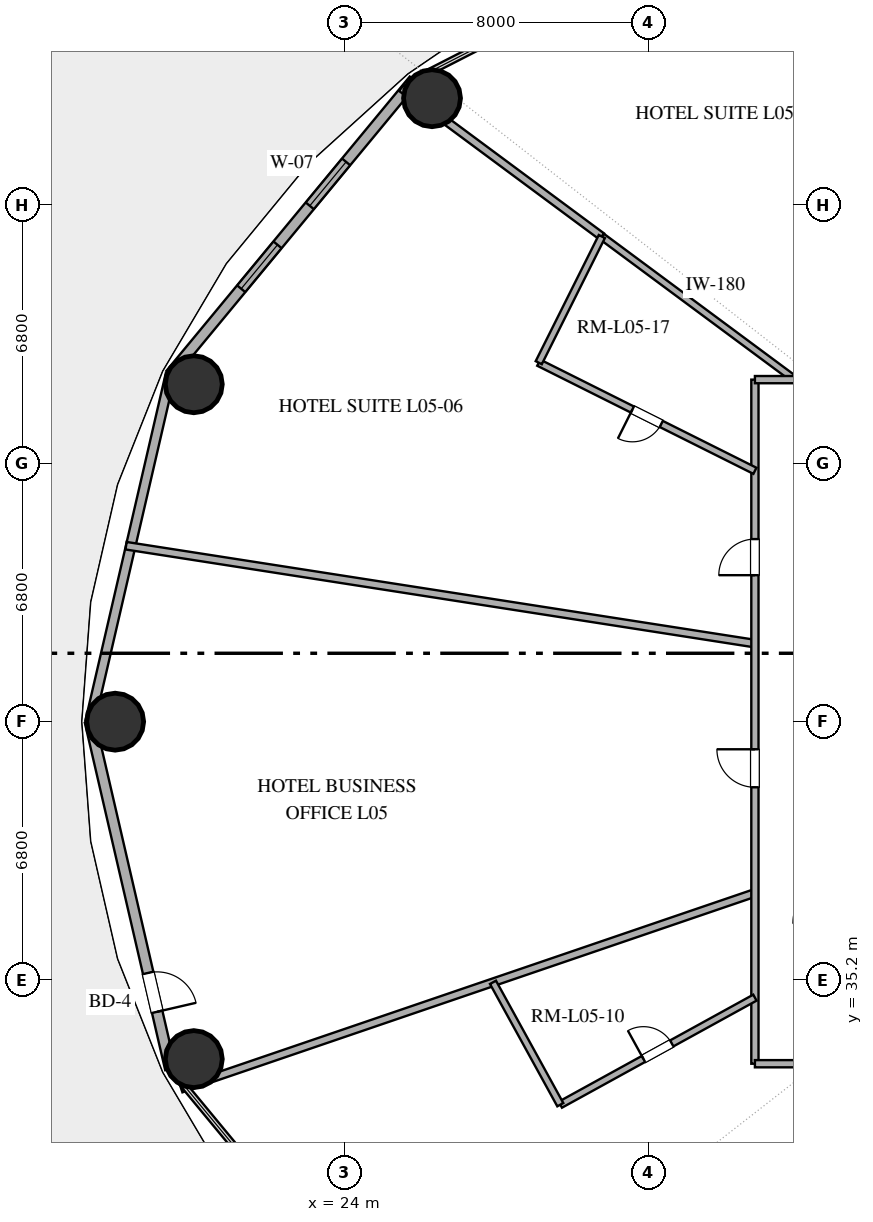
"""IFC4 building model, lengths in metres.
Left out: names, types, materials, properties, quantities, classifications, styles, units other than length and angle.
Written with IfcOpenShell. Run it as: python <this file> out.ifc"""

import sys

from ifc_helpers import new_model, si_unit, direction, frame, frame_2d, origin, origin_2d, place, context, subcontext, project, spatial, rectangle, hollow_circle, extrude, element, fill, save


model = new_model("IFC4")
c1 = context("Model", 3, precision=1e-05, world=origin(), true_north=direction((0.0, 1.0)))
c2 = subcontext(c1, "Body", "Model", "MODEL_VIEW")
j1 = project(units=[si_unit("LENGTHUNIT", "METRE"), si_unit("PLANEANGLEUNIT", "RADIAN")], contexts=[c1])
p1 = place(None, origin())
s1 = spatial("IfcSite", under=j1, at=p1, CompositionType="ELEMENT")
p2 = place(p1, origin())
s2 = spatial("IfcBuilding", under=s1, at=p2, CompositionType="ELEMENT")
p3 = place(p2, frame((0.0, 0.0, 28.2)))
s3 = spatial("IfcBuildingStorey", under=s2, at=p3, CompositionType="ELEMENT", Elevation=28.2)
for number, where, z_axis, x_axis in (
    (1, (26.303, 58.405, 0.0), (0.0, 0.0, 1.0), (1.0, 0.0, 0.0)),
    (2, (20.034, 50.878, 0.0), (0.0, 0.0, 1.0), (1.0, 0.0, 0.0)),
    (3, (17.965, 42.0, 0.0), (0.0, 0.0, 1.0), (1.0, 0.0, 0.0)),
    (4, (20.034, 33.122, 0.0), (0.0, 0.0, 1.0), (1.0, 0.0, 0.0)),
):
    element("IfcColumn", number, at=place(p3, frame(where, z_axis=z_axis, x_axis=x_axis)), inside=s3, PredefinedType="COLUMN", context=c2, shape_type="SweptSolid", body=[
        extrude(hollow_circle(Radius=0.75, WallThickness=0.04, at=origin_2d()), origin(), (0.0, 0.0, 1.0), 3.38),
    ])
p4 = place(p3, frame((25.826, 58.886, 0.0), z_axis=(0.0, 0.0, 1.0), x_axis=(-0.637296809613, -0.770618437657, 0.0)))
e5 = element("IfcWall", 5, at=p4, inside=s3, PredefinedType="SOLIDWALL", context=c2, shape_type="SweptSolid", body=[
    extrude(rectangle(XDim=10.053, YDim=0.28, at=frame_2d((5.027, 0.0))), origin(), (0.0, 0.0, 1.0), 3.38),
])
p5 = place(p4, frame((2.798, 0.0, 0.85)))
e6 = element("IfcOpeningElement", 6, at=p5, cuts=e5, PredefinedType="OPENING", context=c2, shape_type="SweptSolid", body=[
    extrude(rectangle(XDim=1.5, YDim=1.8, at=frame_2d((0.75, 0.9))), frame((0.0, 0.15, 0.0), z_axis=(0.0, -1.0, 0.0), x_axis=(1.0, 0.0, 0.0)), (0.0, 0.0, 1.0), 0.3),
])
p6 = place(p4, frame((5.63, 0.0, 0.85)))
e7 = element("IfcOpeningElement", 7, at=p6, cuts=e5, PredefinedType="OPENING", context=c2, shape_type="SweptSolid", body=[
    extrude(rectangle(XDim=1.5, YDim=1.8, at=frame_2d((0.75, 0.9))), frame((0.0, 0.15, 0.0), z_axis=(0.0, -1.0, 0.0), x_axis=(1.0, 0.0, 0.0)), (0.0, 0.0, 1.0), 0.3),
])
p7 = place(p3, frame((19.419, 51.138, 0.0), z_axis=(0.0, 0.0, 1.0), x_axis=(-0.225454452941, -0.974253709076, 0.0)))
e8 = element("IfcWall", 8, at=p7, inside=s3, PredefinedType="SOLIDWALL", context=c2, shape_type="SweptSolid", body=[
    extrude(rectangle(XDim=9.38, YDim=0.25, at=frame_2d((4.69, 0.0))), origin(), (0.0, 0.0, 1.0), 3.38),
])
p8 = place(p3, frame((17.304, 42.0, 0.0), z_axis=(0.0, 0.0, 1.0), x_axis=(0.225454452941, -0.974253709076, 0.0)))
e9 = element("IfcWall", 9, at=p8, inside=s3, PredefinedType="SOLIDWALL", context=c2, shape_type="SweptSolid", body=[
    extrude(rectangle(XDim=9.38, YDim=0.28, at=frame_2d((4.69, 0.0))), origin(), (0.0, 0.0, 1.0), 3.38),
])
p9 = place(p8, frame((6.785, 0.0, 0.0)))
e10 = element("IfcOpeningElement", 10, at=p9, cuts=e9, PredefinedType="OPENING", context=c2, shape_type="SweptSolid", body=[
    extrude(rectangle(XDim=1.05, YDim=2.2, at=frame_2d((0.525, 1.1))), frame((0.0, 0.15, 0.0), z_axis=(0.0, -1.0, 0.0), x_axis=(1.0, 0.0, 0.0)), (0.0, 0.0, 1.0), 0.3),
])
p10 = place(p3, frame((18.253, 46.63, 0.0), z_axis=(0.0, 0.0, 1.0), x_axis=(0.988105936892, -0.153774697134, 0.0)))
e11 = element("IfcWall", 11, at=p10, inside=s3, PredefinedType="PARTITIONING", context=c2, shape_type="SweptSolid", body=[
    extrude(rectangle(XDim=16.747, YDim=0.2, at=frame_2d((8.373, 0.0))), origin(), (0.0, 0.0, 1.0), 2.74),
])
p11 = place(p3, frame((34.8, 37.494, 0.0), z_axis=(0.0, 0.0, 1.0), x_axis=(-0.946390715793, -0.32302416792, 0.0)))
e12 = element("IfcWall", 12, at=p11, inside=s3, PredefinedType="PARTITIONING", context=c2, shape_type="SweptSolid", body=[
    extrude(rectangle(XDim=15.952, YDim=0.2, at=frame_2d((7.976, 0.0))), origin(), (0.0, 0.0, 1.0), 2.74),
])
p12 = place(p3, frame((34.8, 33.0, 0.0), z_axis=(0.0, 0.0, 1.0), x_axis=(0.0, 1.0, 0.0)))
e13 = element("IfcWall", 13, at=p12, inside=s3, PredefinedType="PARTITIONING", context=c2, shape_type="SweptSolid", body=[
    extrude(rectangle(XDim=18.0, YDim=0.19, at=frame_2d((9.0, 0.0))), origin(), (0.0, 0.0, 1.0), 2.74),
])
p13 = place(p12, frame((7.274, 0.0, 0.0)))
e14 = element("IfcOpeningElement", 14, at=p13, cuts=e13, PredefinedType="OPENING", context=c2, shape_type="SweptSolid", body=[
    extrude(rectangle(XDim=1.0, YDim=2.2, at=frame_2d((0.5, 1.1))), frame((0.0, 0.105, 0.0), z_axis=(0.0, -1.0, 0.0), x_axis=(1.0, 0.0, 0.0)), (0.0, 0.0, 1.0), 0.21),
])
p14 = place(p12, frame((12.854, 0.0, 0.0)))
e15 = element("IfcOpeningElement", 15, at=p14, cuts=e13, PredefinedType="OPENING", context=c2, shape_type="SweptSolid", body=[
    extrude(rectangle(XDim=0.95, YDim=2.15, at=frame_2d((0.475, 1.075))), frame((0.0, 0.105, 0.0), z_axis=(0.0, -1.0, 0.0), x_axis=(1.0, 0.0, 0.0)), (0.0, 0.0, 1.0), 0.21),
])
p15 = place(p3, frame((25.496, 58.675, 0.0), z_axis=(0.0, 0.0, 1.0), x_axis=(0.803457728354, -0.595361804912, 0.0)))
e16 = element("IfcWall", 16, at=p15, inside=s3, PredefinedType="PARTITIONING", context=c2, shape_type="SweptSolid", body=[
    extrude(rectangle(XDim=6.566, YDim=0.2, at=frame_2d((3.283, 0.0))), origin(), (0.0, 0.0, 1.0), 2.74),
])
p16 = place(p3, frame((34.8, 48.601, 0.0), z_axis=(0.0, 0.0, 1.0), x_axis=(-0.894404156958, 0.447259660617, 0.0)))
e17 = element("IfcWall", 17, at=p16, inside=s3, PredefinedType="PLUMBINGWALL", context=c2, shape_type="SweptSolid", body=[
    extrude(rectangle(XDim=6.36, YDim=0.18, at=frame_2d((3.18, 0.0))), origin(), (0.0, 0.0, 1.0), 2.74),
])
p17 = place(p16, frame((2.755, 0.0, 0.0)))
e18 = element("IfcOpeningElement", 18, at=p17, cuts=e17, PredefinedType="OPENING", context=c2, shape_type="SweptSolid", body=[
    extrude(rectangle(XDim=0.85, YDim=2.1, at=frame_2d((0.425, 1.05))), frame((0.0, 0.1, 0.0), z_axis=(0.0, -1.0, 0.0), x_axis=(1.0, 0.0, 0.0)), (0.0, 0.0, 1.0), 0.2),
])
p18 = place(p3, frame((30.772, 54.766, 0.0), z_axis=(0.0, 0.0, 1.0), x_axis=(0.803451199128, -0.595370616187, 0.0)))
e19 = element("IfcWall", 19, at=p18, inside=s3, PredefinedType="PLUMBINGWALL", context=c2, shape_type="SweptSolid", body=[
    extrude(rectangle(XDim=6.325, YDim=0.18, at=frame_2d((3.163, 0.0))), origin(), (0.0, 0.0, 1.0), 2.74),
])
p19 = place(p3, frame((29.679, 31.922, 0.0), z_axis=(0.0, 0.0, 1.0), x_axis=(0.876185038284, 0.481974873503, 0.0)))
e20 = element("IfcWall", 20, at=p19, inside=s3, PredefinedType="PLUMBINGWALL", context=c2, shape_type="SweptSolid", body=[
    extrude(rectangle(XDim=5.844, YDim=0.18, at=frame_2d((2.922, 0.0))), origin(), (0.0, 0.0, 1.0), 2.74),
])
p20 = place(p19, frame((2.497, 0.0, 0.0)))
e21 = element("IfcOpeningElement", 21, at=p20, cuts=e20, PredefinedType="OPENING", context=c2, shape_type="SweptSolid", body=[
    extrude(rectangle(XDim=0.85, YDim=2.1, at=frame_2d((0.425, 1.05))), frame((0.0, 0.1, 0.0), z_axis=(0.0, -1.0, 0.0), x_axis=(1.0, 0.0, 0.0)), (0.0, 0.0, 1.0), 0.2),
])
p21 = place(p3, frame((34.8, 51.0, 0.0), z_axis=(0.0, 0.0, 1.0), x_axis=(1.0, 0.0, 0.0)))
e22 = element("IfcWall", 22, at=p21, inside=s3, PredefinedType="PARTITIONING", context=c2, shape_type="SweptSolid", body=[
    extrude(rectangle(XDim=8.891, YDim=0.19, at=frame_2d((4.445, 0.0))), origin(), (0.0, 0.0, 1.0), 2.74),
])
p22 = place(p21, frame((3.407, 0.0, 0.0)))
e23 = element("IfcOpeningElement", 23, at=p22, cuts=e22, PredefinedType="OPENING", context=c2, shape_type="SweptSolid", body=[
    extrude(rectangle(XDim=0.95, YDim=2.15, at=frame_2d((0.475, 1.075))), frame((0.0, 0.105, 0.0), z_axis=(0.0, -1.0, 0.0), x_axis=(1.0, 0.0, 0.0)), (0.0, 0.0, 1.0), 0.21),
])
p23 = place(p3, frame((35.64, 28.958, 0.0), z_axis=(0.0, 0.0, 1.0), x_axis=(0.687867465085, 0.725836311077, 0.0)))
e24 = element("IfcWall", 24, at=p23, inside=s3, PredefinedType="PLUMBINGWALL", context=c2, shape_type="SweptSolid", body=[
    extrude(rectangle(XDim=5.568, YDim=0.18, at=frame_2d((2.784, 0.0))), origin(), (0.0, 0.0, 1.0), 2.74),
])
p24 = place(p3, frame((42.083, 33.0, 0.0), z_axis=(0.0, 0.0, 1.0), x_axis=(-1.0, 0.0, 0.0)))
e25 = element("IfcWall", 25, at=p24, inside=s3, PredefinedType="PARTITIONING", context=c2, shape_type="SweptSolid", body=[
    extrude(rectangle(XDim=7.283, YDim=0.19, at=frame_2d((3.642, 0.0))), origin(), (0.0, 0.0, 1.0), 2.74),
])
p25 = place(p24, frame((4.451, 0.0, 0.0)))
e26 = element("IfcOpeningElement", 26, at=p25, cuts=e25, PredefinedType="OPENING", context=c2, shape_type="SweptSolid", body=[
    extrude(rectangle(XDim=0.95, YDim=2.15, at=frame_2d((0.475, 1.075))), frame((0.0, 0.105, 0.0), z_axis=(0.0, -1.0, 0.0), x_axis=(1.0, 0.0, 0.0)), (0.0, 0.0, 1.0), 0.21),
])
p26 = place(p3, frame((29.112, 51.446, 0.0), z_axis=(0.0, 0.0, 1.0), x_axis=(0.447292516126, 0.894387726334, 0.0)))
e27 = element("IfcWall", 27, at=p26, inside=s3, PredefinedType="PLUMBINGWALL", context=c2, shape_type="SweptSolid", body=[
    extrude(rectangle(XDim=3.712, YDim=0.18, at=frame_2d((1.856, 0.0))), origin(), (0.0, 0.0, 1.0), 2.74),
])
p27 = place(p3, frame((27.908, 35.142, 0.0), z_axis=(0.0, 0.0, 1.0), x_axis=(0.481967195945, -0.876189261537, 0.0)))
e28 = element("IfcWall", 28, at=p27, inside=s3, PredefinedType="PLUMBINGWALL", context=c2, shape_type="SweptSolid", body=[
    extrude(rectangle(XDim=3.676, YDim=0.18, at=frame_2d((1.838, 0.0))), origin(), (0.0, 0.0, 1.0), 2.74),
])
p28 = place(p5, origin())
e29 = element("IfcWindow", 29, at=p28, inside=s3, PartitioningType="SINGLE_PANEL", PredefinedType="WINDOW", context=c2, shape_type="SweptSolid", body=[
    extrude(rectangle(XDim=1.5, YDim=1.8, at=frame_2d((0.75, 0.9))), frame((0.0, 0.03, 0.0), z_axis=(0.0, -1.0, 0.0), x_axis=(1.0, 0.0, 0.0)), (0.0, 0.0, 1.0), 0.06),
])
fill(e6, e29)
p29 = place(p6, origin())
e30 = element("IfcWindow", 30, at=p29, inside=s3, PartitioningType="SINGLE_PANEL", PredefinedType="WINDOW", context=c2, shape_type="SweptSolid", body=[
    extrude(rectangle(XDim=1.5, YDim=1.8, at=frame_2d((0.75, 0.9))), frame((0.0, 0.03, 0.0), z_axis=(0.0, -1.0, 0.0), x_axis=(1.0, 0.0, 0.0)), (0.0, 0.0, 1.0), 0.06),
])
fill(e7, e30)
p30 = place(p9, origin())
e31 = element("IfcDoor", 31, at=p30, inside=s3, OperationType="SINGLE_SWING_RIGHT", PredefinedType="DOOR", context=c2, shape_type="SweptSolid", body=[
    extrude(rectangle(XDim=1.05, YDim=2.2, at=frame_2d((0.525, 1.1))), frame((0.0, 0.025, 0.0), z_axis=(0.0, -1.0, 0.0), x_axis=(1.0, 0.0, 0.0)), (0.0, 0.0, 1.0), 0.05),
])
fill(e10, e31)
p31 = place(p13, origin())
e32 = element("IfcDoor", 32, at=p31, inside=s3, OperationType="SINGLE_SWING_RIGHT", PredefinedType="DOOR", context=c2, shape_type="SweptSolid", body=[
    extrude(rectangle(XDim=1.0, YDim=2.2, at=frame_2d((0.5, 1.1))), frame((0.0, 0.025, 0.0), z_axis=(0.0, -1.0, 0.0), x_axis=(1.0, 0.0, 0.0)), (0.0, 0.0, 1.0), 0.05),
])
fill(e14, e32)
p32 = place(p14, origin())
e33 = element("IfcDoor", 33, at=p32, inside=s3, OperationType="SINGLE_SWING_LEFT", PredefinedType="DOOR", context=c2, shape_type="SweptSolid", body=[
    extrude(rectangle(XDim=0.95, YDim=2.15, at=frame_2d((0.475, 1.075))), frame((0.0, 0.025, 0.0), z_axis=(0.0, -1.0, 0.0), x_axis=(1.0, 0.0, 0.0)), (0.0, 0.0, 1.0), 0.05),
])
fill(e15, e33)
p33 = place(p17, origin())
e34 = element("IfcDoor", 34, at=p33, inside=s3, OperationType="SINGLE_SWING_RIGHT", PredefinedType="DOOR", context=c2, shape_type="SweptSolid", body=[
    extrude(rectangle(XDim=0.85, YDim=2.1, at=frame_2d((0.425, 1.05))), frame((0.0, 0.025, 0.0), z_axis=(0.0, -1.0, 0.0), x_axis=(1.0, 0.0, 0.0)), (0.0, 0.0, 1.0), 0.05),
])
fill(e18, e34)
p34 = place(p20, origin())
e35 = element("IfcDoor", 35, at=p34, inside=s3, OperationType="SINGLE_SWING_LEFT", PredefinedType="DOOR", context=c2, shape_type="SweptSolid", body=[
    extrude(rectangle(XDim=0.85, YDim=2.1, at=frame_2d((0.425, 1.05))), frame((0.0, 0.025, 0.0), z_axis=(0.0, -1.0, 0.0), x_axis=(1.0, 0.0, 0.0)), (0.0, 0.0, 1.0), 0.05),
])
fill(e21, e35)
save(model, sys.argv[1])
